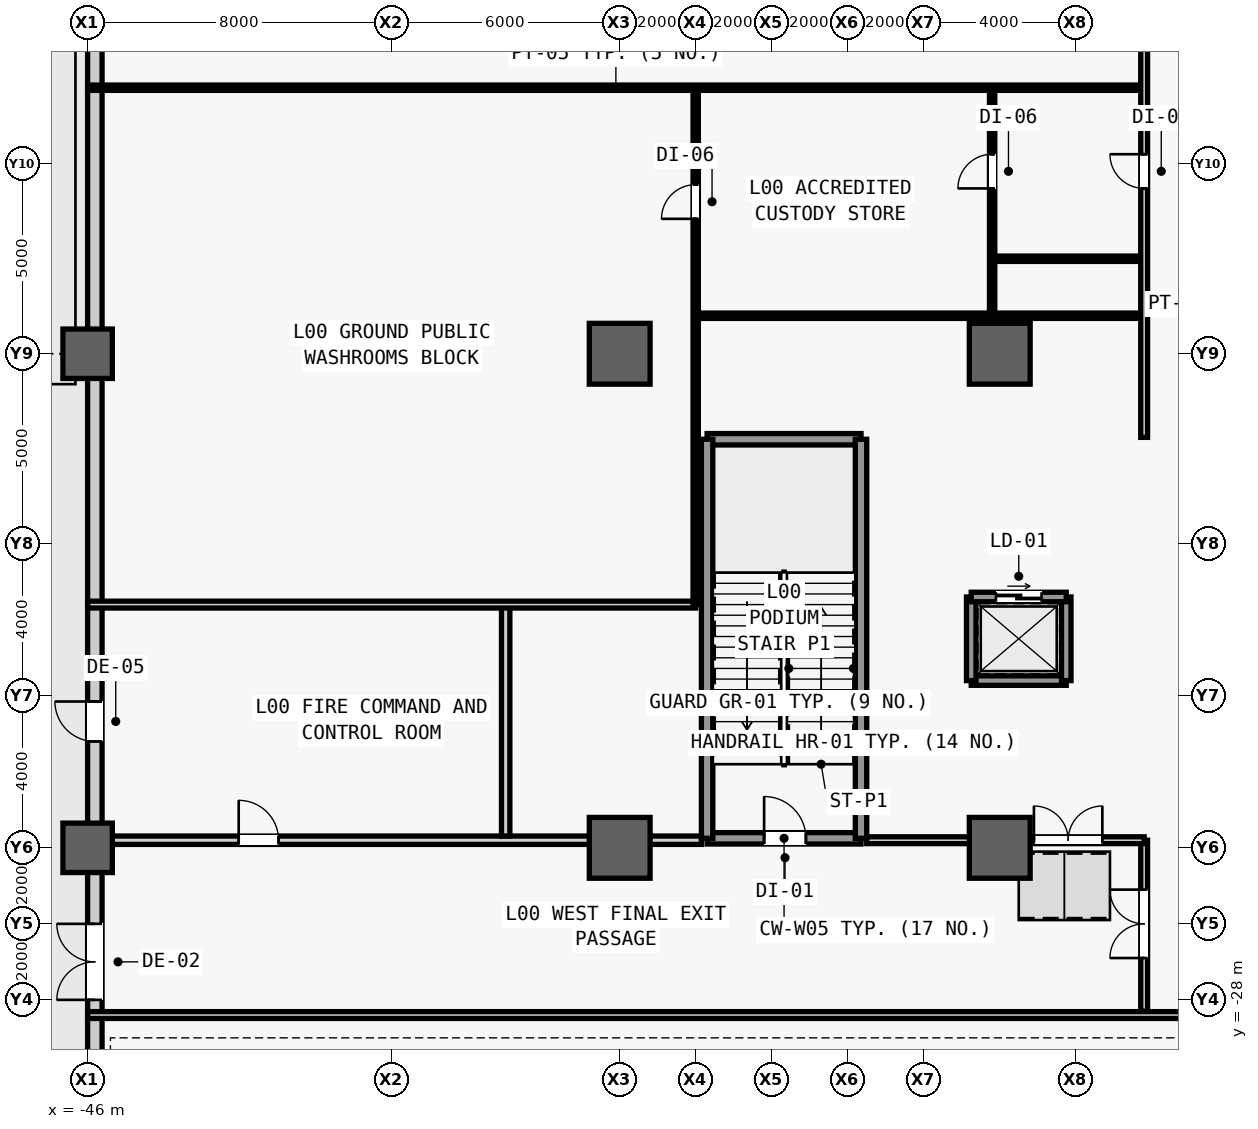
"""IFC4 building model, lengths in metres.
Left out: names, types, materials, properties, quantities, classifications, styles, units other than length and angle.
Written with IfcOpenShell. Run it as: python <this file> out.ifc"""

import sys

from ifc_helpers import new_model, si_unit, direction, frame, frame_2d, origin, origin_2d, place, context, subcontext, project, spatial, rectangle, extrude, source, transform, mapped, element, fill, save


model = new_model("IFC4")
c1 = context("Model", 3, precision=1e-05, world=origin(), true_north=direction((0.0, 1.0)))
c2 = subcontext(c1, "Body", "Model", "MODEL_VIEW")
j1 = project(units=[si_unit("LENGTHUNIT", "METRE"), si_unit("PLANEANGLEUNIT", "RADIAN")], contexts=[c1])
p1 = place(None, origin())
s1 = spatial("IfcSite", under=j1, at=p1, CompositionType="ELEMENT")
p2 = place(p1, origin())
s2 = spatial("IfcBuilding", under=s1, at=p2, CompositionType="ELEMENT")
p3 = place(p2, origin())
s3 = spatial("IfcBuildingStorey", under=s2, at=p3, CompositionType="ELEMENT", Elevation=0.0)
m1 = source(origin(), c2, "Body", "SweptSolid", [
    extrude(rectangle(XDim=1.3, YDim=1.3, at=origin_2d()), origin(), (0.0, 0.0, 1.0), 6.6),
])
for number, where, z_axis, x_axis in (
    (1, (-46.0, -24.0, 0.0), (0.0, 0.0, 1.0), (1.0, 0.0, 0.0)),
    (2, (-46.0, -11.0, 0.0), (0.0, 0.0, 1.0), (1.0, 0.0, 0.0)),
):
    element("IfcColumn", number, at=place(p3, frame(where, z_axis=z_axis, x_axis=x_axis)), inside=s3, PredefinedType="COLUMN", context=c2, shape_type="MappedRepresentation", body=[
        mapped(m1, transform((0.0, 0.0, 0.0), scale=1.0)),
    ])
m2 = source(origin(), c2, "Body", "SweptSolid", [
    extrude(rectangle(XDim=1.6, YDim=1.6, at=origin_2d()), origin(), (0.0, 0.0, 1.0), 6.6),
])
for number, where, z_axis, x_axis in (
    (3, (-32.0, -24.0, 0.0), (0.0, 0.0, 1.0), (1.0, 0.0, 0.0)),
    (4, (-32.0, -11.0, 0.0), (0.0, 0.0, 1.0), (1.0, 0.0, 0.0)),
    (5, (-22.0, -24.0, 0.0), (0.0, 0.0, 1.0), (1.0, 0.0, 0.0)),
    (6, (-22.0, -11.0, 0.0), (0.0, 0.0, 1.0), (1.0, 0.0, 0.0)),
):
    element("IfcColumn", number, at=place(p3, frame(where, z_axis=z_axis, x_axis=x_axis)), inside=s3, PredefinedType="COLUMN", context=c2, shape_type="MappedRepresentation", body=[
        mapped(m2, transform((0.0, 0.0, 0.0), scale=1.0)),
    ])
m3 = source(origin(), c2, "Body", "SweptSolid", [
    extrude(rectangle(XDim=75.1, YDim=0.38, at=frame_2d((37.55, 0.0))), origin(), (0.0, 0.0, 1.0), 4.48),
])
p4 = place(p3, frame((-45.81, -37.55, 0.0), z_axis=(0.0, 0.0, 1.0), x_axis=(0.0, 1.0, 0.0)))
e7 = element("IfcWall", 7, at=p4, inside=s3, PredefinedType="STANDARD", context=c2, shape_type="MappedRepresentation", body=[
    mapped(m3, transform((0.0, 0.0, 0.0), scale=1.0)),
])
m4 = source(origin(), c2, "Body", "SweptSolid", [
    extrude(rectangle(XDim=2.0, YDim=2.3, at=frame_2d((1.0, 1.15))), frame((0.0, 0.2, 0.0), z_axis=(0.0, -1.0, 0.0), x_axis=(1.0, 0.0, 0.0)), (0.0, 0.0, 1.0), 0.4),
])
p5 = place(p4, frame((9.55, 0.0, 0.0)))
e8 = element("IfcOpeningElement", 8, at=p5, cuts=e7, PredefinedType="OPENING", context=c2, shape_type="MappedRepresentation", body=[
    mapped(m4, transform((0.0, 0.0, 0.0), scale=1.0)),
])
m5 = source(origin(), c2, "Body", "SweptSolid", [
    extrude(rectangle(XDim=1.05, YDim=2.25, at=frame_2d((0.525, 1.125))), frame((0.0, 0.2, 0.0), z_axis=(0.0, -1.0, 0.0), x_axis=(1.0, 0.0, 0.0)), (0.0, 0.0, 1.0), 0.4),
])
p6 = place(p4, frame((16.35, 0.0, 0.0)))
e9 = element("IfcOpeningElement", 9, at=p6, cuts=e7, PredefinedType="OPENING", context=c2, shape_type="MappedRepresentation", body=[
    mapped(m5, transform((0.0, 0.0, 0.0), scale=1.0)),
])
m6 = source(origin(), c2, "Body", "SweptSolid", [
    extrude(rectangle(XDim=4.2, YDim=4.2, at=frame_2d((2.1, 2.1))), frame((0.0, 0.2, 0.0), z_axis=(0.0, -1.0, 0.0), x_axis=(1.0, 0.0, 0.0)), (0.0, 0.0, 1.0), 0.4),
])
p7 = place(p4, frame((64.45, 0.0, 0.0)))
e10 = element("IfcOpeningElement", 10, at=p7, cuts=e7, PredefinedType="OPENING", context=c2, shape_type="MappedRepresentation", body=[
    mapped(m6, transform((0.0, 0.0, 0.0), scale=1.0)),
])
m7 = source(origin(), c2, "Body", "SweptSolid", [
    extrude(rectangle(XDim=2.4, YDim=2.6, at=frame_2d((1.2, 1.3))), frame((0.0, 0.2, 0.0), z_axis=(0.0, -1.0, 0.0), x_axis=(1.0, 0.0, 0.0)), (0.0, 0.0, 1.0), 0.4),
])
p8 = place(p4, frame((55.125, 0.0, 0.7)))
e11 = element("IfcOpeningElement", 11, at=p8, cuts=e7, PredefinedType="OPENING", context=c2, shape_type="MappedRepresentation", body=[
    mapped(m7, transform((0.0, 0.0, 0.0), scale=1.0)),
])
m8 = source(origin(), c2, "Body", "SweptSolid", [
    extrude(rectangle(XDim=4.05, YDim=0.3, at=frame_2d((2.025, 0.0))), origin(), (0.0, 0.0, 1.0), 6.28),
])
p9 = place(p3, frame((-29.7, -23.75, 0.0), z_axis=(0.0, 0.0, 1.0), x_axis=(1.0, 0.0, 0.0)))
e12 = element("IfcWall", 12, at=p9, inside=s3, PredefinedType="SHEAR", context=c2, shape_type="MappedRepresentation", body=[
    mapped(m8, transform((0.0, 0.0, 0.0), scale=1.0)),
])
m9 = source(origin(), c2, "Body", "SweptSolid", [
    extrude(rectangle(XDim=1.1, YDim=2.2, at=frame_2d((0.55, 1.1))), frame((0.0, 0.16, 0.0), z_axis=(0.0, -1.0, 0.0), x_axis=(1.0, 0.0, 0.0)), (0.0, 0.0, 1.0), 0.32),
])
p10 = place(p9, frame((1.5, 0.0, 0.0)))
e13 = element("IfcOpeningElement", 13, at=p10, cuts=e12, PredefinedType="OPENING", context=c2, shape_type="MappedRepresentation", body=[
    mapped(m9, transform((0.0, 0.0, 0.0), scale=1.0)),
])
p11 = place(p3, frame((-29.7, -13.25, 0.0), z_axis=(0.0, 0.0, 1.0), x_axis=(1.0, 0.0, 0.0)))
e14 = element("IfcWall", 14, at=p11, inside=s3, PredefinedType="SHEAR", context=c2, shape_type="MappedRepresentation", body=[
    mapped(m8, transform((0.0, 0.0, 0.0), scale=1.0)),
])
m10 = source(origin(), c2, "Body", "SweptSolid", [
    extrude(rectangle(XDim=10.5, YDim=0.3, at=frame_2d((5.25, 0.0))), origin(), (0.0, 0.0, 1.0), 6.28),
])
for number, where, z_axis, x_axis in (
    (15, (-29.7, -23.75, 0.0), (0.0, 0.0, 1.0), (0.0, 1.0, 0.0)),
    (16, (-25.65, -23.75, 0.0), (0.0, 0.0, 1.0), (0.0, 1.0, 0.0)),
):
    element("IfcWall", number, at=place(p3, frame(where, z_axis=z_axis, x_axis=x_axis)), inside=s3, PredefinedType="SHEAR", context=c2, shape_type="MappedRepresentation", body=[
        mapped(m10, transform((0.0, 0.0, 0.0), scale=1.0)),
    ])
m11 = source(origin(), c2, "Body", "SweptSolid", [
    extrude(rectangle(XDim=2.5, YDim=0.25, at=frame_2d((1.25, 0.0))), origin(), (0.0, 0.0, 1.0), 6.28),
])
p12 = place(p3, frame((-22.75, -19.6, 0.0), z_axis=(0.0, 0.0, 1.0), x_axis=(1.0, 0.0, 0.0)))
e17 = element("IfcWall", 17, at=p12, inside=s3, PredefinedType="SHEAR", context=c2, shape_type="MappedRepresentation", body=[
    mapped(m11, transform((0.0, 0.0, 0.0), scale=1.0)),
])
m12 = source(origin(), c2, "Body", "SweptSolid", [
    extrude(rectangle(XDim=2.2, YDim=0.25, at=frame_2d((1.1, 0.0))), origin(), (0.0, 0.0, 1.0), 6.28),
])
for number, where, z_axis, x_axis in (
    (18, (-22.75, -19.6, 0.0), (0.0, 0.0, 1.0), (0.0, 1.0, 0.0)),
    (19, (-20.25, -19.6, 0.0), (0.0, 0.0, 1.0), (0.0, 1.0, 0.0)),
):
    element("IfcWall", number, at=place(p3, frame(where, z_axis=z_axis, x_axis=x_axis)), inside=s3, PredefinedType="SHEAR", context=c2, shape_type="MappedRepresentation", body=[
        mapped(m12, transform((0.0, 0.0, 0.0), scale=1.0)),
    ])
p13 = place(p3, frame((-22.75, -17.4, 0.0), z_axis=(0.0, 0.0, 1.0), x_axis=(1.0, 0.0, 0.0)))
e20 = element("IfcWall", 20, at=p13, inside=s3, PredefinedType="SHEAR", context=c2, shape_type="MappedRepresentation", body=[
    mapped(m11, transform((0.0, 0.0, 0.0), scale=1.0)),
])
m13 = source(origin(), c2, "Body", "SweptSolid", [
    extrude(rectangle(XDim=1.2, YDim=2.3, at=frame_2d((0.6, 1.15))), frame((0.0, 0.135, 0.0), z_axis=(0.0, -1.0, 0.0), x_axis=(1.0, 0.0, 0.0)), (0.0, 0.0, 1.0), 0.27),
])
p14 = place(p13, frame((0.65, 0.0, 0.0)))
e21 = element("IfcOpeningElement", 21, at=p14, cuts=e20, PredefinedType="OPENING", context=c2, shape_type="MappedRepresentation", body=[
    mapped(m13, transform((0.0, 0.0, 0.0), scale=1.0)),
])
m14 = source(origin(), c2, "Body", "SweptSolid", [
    extrude(rectangle(XDim=30.6, YDim=0.18, at=frame_2d((15.3, 0.0))), origin(), (0.0, 0.0, 1.0), 4.08),
])
p15 = place(p3, frame((-46.0, -28.4, 0.0), z_axis=(0.0, 0.0, 1.0), x_axis=(1.0, 0.0, 0.0)))
e22 = element("IfcWall", 22, at=p15, inside=s3, PredefinedType="PARTITIONING", context=c2, shape_type="MappedRepresentation", body=[
    mapped(m14, transform((0.0, 0.0, 0.0), scale=1.0)),
])
m15 = source(origin(), c2, "Body", "SweptSolid", [
    extrude(rectangle(XDim=4.5, YDim=0.18, at=frame_2d((2.25, 0.0))), origin(), (0.0, 0.0, 1.0), 6.28),
])
p16 = place(p3, frame((-18.2, -28.3, 0.0), z_axis=(0.0, 0.0, 1.0), x_axis=(0.0, 1.0, 0.0)))
e23 = element("IfcWall", 23, at=p16, inside=s3, PredefinedType="PARTITIONING", context=c2, shape_type="MappedRepresentation", body=[
    mapped(m15, transform((0.0, 0.0, 0.0), scale=1.0)),
])
m16 = source(origin(), c2, "Body", "SweptSolid", [
    extrude(rectangle(XDim=1.8, YDim=2.25, at=frame_2d((0.9, 1.125))), frame((0.0, 0.1, 0.0), z_axis=(0.0, -1.0, 0.0), x_axis=(1.0, 0.0, 0.0)), (0.0, 0.0, 1.0), 0.2),
])
p17 = place(p16, frame((1.4, 0.0, 0.0)))
e24 = element("IfcOpeningElement", 24, at=p17, cuts=e23, PredefinedType="OPENING", context=c2, shape_type="MappedRepresentation", body=[
    mapped(m16, transform((0.0, 0.0, 0.0), scale=1.0)),
])
m17 = source(origin(), c2, "Body", "SweptSolid", [
    extrude(rectangle(XDim=16.15, YDim=0.22, at=frame_2d((8.075, 0.0))), origin(), (0.0, 0.0, 1.0), 4.48),
])
p18 = place(p3, frame((-46.0, -23.8, 0.0), z_axis=(0.0, 0.0, 1.0), x_axis=(1.0, 0.0, 0.0)))
e25 = element("IfcWall", 25, at=p18, inside=s3, PredefinedType="PARTITIONING", context=c2, shape_type="MappedRepresentation", body=[
    mapped(m17, transform((0.0, 0.0, 0.0), scale=1.0)),
])
m18 = source(origin(), c2, "Body", "SweptSolid", [
    extrude(rectangle(XDim=1.05, YDim=2.2, at=frame_2d((0.525, 1.1))), frame((0.0, 0.12, 0.0), z_axis=(0.0, -1.0, 0.0), x_axis=(1.0, 0.0, 0.0)), (0.0, 0.0, 1.0), 0.24),
])
p19 = place(p18, frame((3.975, 0.0, 0.0)))
e26 = element("IfcOpeningElement", 26, at=p19, cuts=e25, PredefinedType="OPENING", context=c2, shape_type="MappedRepresentation", body=[
    mapped(m18, transform((0.0, 0.0, 0.0), scale=1.0)),
])
m19 = source(origin(), c2, "Body", "SweptSolid", [
    extrude(rectangle(XDim=7.3, YDim=0.18, at=frame_2d((3.65, 0.0))), origin(), (0.0, 0.0, 1.0), 4.08),
])
p20 = place(p3, frame((-25.5, -23.8, 0.0), z_axis=(0.0, 0.0, 1.0), x_axis=(1.0, 0.0, 0.0)))
e27 = element("IfcWall", 27, at=p20, inside=s3, PredefinedType="PARTITIONING", context=c2, shape_type="MappedRepresentation", body=[
    mapped(m19, transform((0.0, 0.0, 0.0), scale=1.0)),
])
p21 = place(p20, frame((4.4, 0.0, 0.0)))
e28 = element("IfcOpeningElement", 28, at=p21, cuts=e27, PredefinedType="OPENING", context=c2, shape_type="MappedRepresentation", body=[
    mapped(m16, transform((0.0, 0.0, 0.0), scale=1.0)),
])
m20 = source(origin(), c2, "Body", "SweptSolid", [
    extrude(rectangle(XDim=6.09, YDim=0.22, at=frame_2d((3.045, 0.0))), origin(), (0.0, 0.0, 1.0), 6.28),
])
p22 = place(p3, frame((-35.0, -23.69, 0.0), z_axis=(0.0, 0.0, 1.0), x_axis=(0.0, 1.0, 0.0)))
e29 = element("IfcWall", 29, at=p22, inside=s3, PredefinedType="PARTITIONING", context=c2, shape_type="MappedRepresentation", body=[
    mapped(m20, transform((0.0, 0.0, 0.0), scale=1.0)),
])
m21 = source(origin(), c2, "Body", "SweptSolid", [
    extrude(rectangle(XDim=16.0, YDim=0.18, at=frame_2d((8.0, 0.0))), origin(), (0.0, 0.0, 1.0), 6.28),
])
p23 = place(p3, frame((-46.0, -17.6, 0.0), z_axis=(0.0, 0.0, 1.0), x_axis=(1.0, 0.0, 0.0)))
e30 = element("IfcWall", 30, at=p23, inside=s3, PredefinedType="PARTITIONING", context=c2, shape_type="MappedRepresentation", body=[
    mapped(m21, transform((0.0, 0.0, 0.0), scale=1.0)),
])
m22 = source(origin(), c2, "Body", "SweptSolid", [
    extrude(rectangle(XDim=27.8, YDim=0.14, at=frame_2d((13.9, 0.0))), origin(), (0.0, 0.0, 1.0), 6.28),
])
p24 = place(p3, frame((-46.0, -4.0, 0.0), z_axis=(0.0, 0.0, 1.0), x_axis=(1.0, 0.0, 0.0)))
e31 = element("IfcWall", 31, at=p24, inside=s3, PredefinedType="PARTITIONING", context=c2, shape_type="MappedRepresentation", body=[
    mapped(m22, transform((0.0, 0.0, 0.0), scale=1.0)),
])
m23 = source(origin(), c2, "Body", "SweptSolid", [
    extrude(rectangle(XDim=13.6, YDim=0.14, at=frame_2d((6.8, 0.0))), origin(), (0.0, 0.0, 1.0), 6.28),
])
p25 = place(p3, frame((-30.0, -17.6, 0.0), z_axis=(0.0, 0.0, 1.0), x_axis=(0.0, 1.0, 0.0)))
e32 = element("IfcWall", 32, at=p25, inside=s3, PredefinedType="PARTITIONING", context=c2, shape_type="MappedRepresentation", body=[
    mapped(m23, transform((0.0, 0.0, 0.0), scale=1.0)),
])
m24 = source(origin(), c2, "Body", "SweptSolid", [
    extrude(rectangle(XDim=0.9, YDim=2.15, at=frame_2d((0.45, 1.075))), frame((0.0, 0.08, 0.0), z_axis=(0.0, -1.0, 0.0), x_axis=(1.0, 0.0, 0.0)), (0.0, 0.0, 1.0), 0.16),
])
p26 = place(p25, frame((10.15, 0.0, 0.0)))
e33 = element("IfcOpeningElement", 33, at=p26, cuts=e32, PredefinedType="OPENING", context=c2, shape_type="MappedRepresentation", body=[
    mapped(m24, transform((0.0, 0.0, 0.0), scale=1.0)),
])
m25 = source(origin(), c2, "Body", "SweptSolid", [
    extrude(rectangle(XDim=11.8, YDim=0.14, at=frame_2d((5.9, 0.0))), origin(), (0.0, 0.0, 1.0), 6.28),
])
p27 = place(p3, frame((-30.0, -10.0, 0.0), z_axis=(0.0, 0.0, 1.0), x_axis=(1.0, 0.0, 0.0)))
e34 = element("IfcWall", 34, at=p27, inside=s3, PredefinedType="PARTITIONING", context=c2, shape_type="MappedRepresentation", body=[
    mapped(m25, transform((0.0, 0.0, 0.0), scale=1.0)),
])
m26 = source(origin(), c2, "Body", "SweptSolid", [
    extrude(rectangle(XDim=6.0, YDim=0.14, at=frame_2d((3.0, 0.0))), origin(), (0.0, 0.0, 1.0), 4.48),
])
p28 = place(p3, frame((-22.2, -10.0, 0.0), z_axis=(0.0, 0.0, 1.0), x_axis=(0.0, 1.0, 0.0)))
e35 = element("IfcWall", 35, at=p28, inside=s3, PredefinedType="PARTITIONING", context=c2, shape_type="MappedRepresentation", body=[
    mapped(m26, transform((0.0, 0.0, 0.0), scale=1.0)),
])
p29 = place(p28, frame((3.35, 0.0, 0.0)))
e36 = element("IfcOpeningElement", 36, at=p29, cuts=e35, PredefinedType="OPENING", context=c2, shape_type="MappedRepresentation", body=[
    mapped(m24, transform((0.0, 0.0, 0.0), scale=1.0)),
])
m27 = source(origin(), c2, "Body", "SweptSolid", [
    extrude(rectangle(XDim=4.0, YDim=0.14, at=frame_2d((2.0, 0.0))), origin(), (0.0, 0.0, 1.0), 6.28),
])
p30 = place(p3, frame((-22.2, -8.5, 0.0), z_axis=(0.0, 0.0, 1.0), x_axis=(1.0, 0.0, 0.0)))
e37 = element("IfcWall", 37, at=p30, inside=s3, PredefinedType="PARTITIONING", context=c2, shape_type="MappedRepresentation", body=[
    mapped(m27, transform((0.0, 0.0, 0.0), scale=1.0)),
])
m28 = source(origin(), c2, "Body", "SweptSolid", [
    extrude(rectangle(XDim=27.0, YDim=0.18, at=frame_2d((13.5, 0.0))), origin(), (0.0, 0.0, 1.0), 6.28),
])
p31 = place(p3, frame((-18.2, -13.2, 0.0), z_axis=(0.0, 0.0, 1.0), x_axis=(0.0, 1.0, 0.0)))
e38 = element("IfcWall", 38, at=p31, inside=s3, PredefinedType="PARTITIONING", context=c2, shape_type="MappedRepresentation", body=[
    mapped(m28, transform((0.0, 0.0, 0.0), scale=1.0)),
])
m29 = source(origin(), c2, "Body", "SweptSolid", [
    extrude(rectangle(XDim=0.9, YDim=2.15, at=frame_2d((0.45, 1.075))), frame((0.0, 0.1, 0.0), z_axis=(0.0, -1.0, 0.0), x_axis=(1.0, 0.0, 0.0)), (0.0, 0.0, 1.0), 0.2),
])
p32 = place(p31, frame((6.55, 0.0, 0.0)))
e39 = element("IfcOpeningElement", 39, at=p32, cuts=e38, PredefinedType="OPENING", context=c2, shape_type="MappedRepresentation", body=[
    mapped(m29, transform((0.0, 0.0, 0.0), scale=1.0)),
])
m30 = source(origin(), c2, "Body", "SweptSolid", [
    extrude(rectangle(XDim=1.05, YDim=2.2, at=frame_2d((0.525, 1.1))), frame((0.0, 0.1, 0.0), z_axis=(0.0, -1.0, 0.0), x_axis=(1.0, 0.0, 0.0)), (0.0, 0.0, 1.0), 0.2),
])
p33 = place(p31, frame((17.675, 0.0, 0.0)))
e40 = element("IfcOpeningElement", 40, at=p33, cuts=e38, PredefinedType="OPENING", context=c2, shape_type="MappedRepresentation", body=[
    mapped(m30, transform((0.0, 0.0, 0.0), scale=1.0)),
])
m31 = source(origin(), c2, "Body", "SweptSolid", [
    extrude(rectangle(XDim=2.0, YDim=2.3, at=frame_2d((1.0, 1.15))), frame((0.0, 0.025, 0.0), z_axis=(0.0, -1.0, 0.0), x_axis=(1.0, 0.0, 0.0)), (0.0, 0.0, 1.0), 0.05),
])
p34 = place(p5, origin())
e41 = element("IfcDoor", 41, at=p34, inside=s3, OperationType="SINGLE_SWING_RIGHT", PredefinedType="DOOR", context=c2, shape_type="MappedRepresentation", body=[
    mapped(m31, transform((0.0, 0.0, 0.0), scale=1.0)),
])
fill(e8, e41)
m32 = source(origin(), c2, "Body", "SweptSolid", [
    extrude(rectangle(XDim=1.05, YDim=2.25, at=frame_2d((0.525, 1.125))), frame((0.0, 0.025, 0.0), z_axis=(0.0, -1.0, 0.0), x_axis=(1.0, 0.0, 0.0)), (0.0, 0.0, 1.0), 0.05),
])
p35 = place(p6, origin())
e42 = element("IfcDoor", 42, at=p35, inside=s3, OperationType="SINGLE_SWING_RIGHT", PredefinedType="DOOR", context=c2, shape_type="MappedRepresentation", body=[
    mapped(m32, transform((0.0, 0.0, 0.0), scale=1.0)),
])
fill(e9, e42)
m33 = source(origin(), c2, "Body", "SweptSolid", [
    extrude(rectangle(XDim=1.1, YDim=2.2, at=frame_2d((0.55, 1.1))), frame((0.0, 0.025, 0.0), z_axis=(0.0, -1.0, 0.0), x_axis=(1.0, 0.0, 0.0)), (0.0, 0.0, 1.0), 0.05),
])
p36 = place(p10, origin())
e43 = element("IfcDoor", 43, at=p36, inside=s3, OperationType="SINGLE_SWING_LEFT", PredefinedType="DOOR", context=c2, shape_type="MappedRepresentation", body=[
    mapped(m33, transform((0.0, 0.0, 0.0), scale=1.0)),
])
fill(e13, e43)
m34 = source(origin(), c2, "Body", "SweptSolid", [
    extrude(rectangle(XDim=1.8, YDim=2.25, at=frame_2d((0.9, 1.125))), frame((0.0, 0.025, 0.0), z_axis=(0.0, -1.0, 0.0), x_axis=(1.0, 0.0, 0.0)), (0.0, 0.0, 1.0), 0.05),
])
p37 = place(p17, origin())
e44 = element("IfcDoor", 44, at=p37, inside=s3, OperationType="SINGLE_SWING_LEFT", PredefinedType="DOOR", context=c2, shape_type="MappedRepresentation", body=[
    mapped(m34, transform((0.0, 0.0, 0.0), scale=1.0)),
])
fill(e24, e44)
m35 = source(origin(), c2, "Body", "SweptSolid", [
    extrude(rectangle(XDim=1.05, YDim=2.2, at=frame_2d((0.525, 1.1))), frame((0.0, 0.025, 0.0), z_axis=(0.0, -1.0, 0.0), x_axis=(1.0, 0.0, 0.0)), (0.0, 0.0, 1.0), 0.05),
])
p38 = place(p19, origin())
e45 = element("IfcDoor", 45, at=p38, inside=s3, OperationType="SINGLE_SWING_LEFT", PredefinedType="DOOR", context=c2, shape_type="MappedRepresentation", body=[
    mapped(m35, transform((0.0, 0.0, 0.0), scale=1.0)),
])
fill(e26, e45)
p39 = place(p21, origin())
e46 = element("IfcDoor", 46, at=p39, inside=s3, OperationType="SINGLE_SWING_LEFT", PredefinedType="DOOR", context=c2, shape_type="MappedRepresentation", body=[
    mapped(m34, transform((0.0, 0.0, 0.0), scale=1.0)),
])
fill(e28, e46)
m36 = source(origin(), c2, "Body", "SweptSolid", [
    extrude(rectangle(XDim=0.9, YDim=2.15, at=frame_2d((0.45, 1.075))), frame((0.0, 0.025, 0.0), z_axis=(0.0, -1.0, 0.0), x_axis=(1.0, 0.0, 0.0)), (0.0, 0.0, 1.0), 0.05),
])
p40 = place(p26, origin())
e47 = element("IfcDoor", 47, at=p40, inside=s3, OperationType="SINGLE_SWING_LEFT", PredefinedType="DOOR", context=c2, shape_type="MappedRepresentation", body=[
    mapped(m36, transform((0.0, 0.0, 0.0), scale=1.0)),
])
fill(e33, e47)
p41 = place(p29, origin())
e48 = element("IfcDoor", 48, at=p41, inside=s3, OperationType="SINGLE_SWING_LEFT", PredefinedType="DOOR", context=c2, shape_type="MappedRepresentation", body=[
    mapped(m36, transform((0.0, 0.0, 0.0), scale=1.0)),
])
fill(e36, e48)
p42 = place(p32, origin())
e49 = element("IfcDoor", 49, at=p42, inside=s3, OperationType="SINGLE_SWING_RIGHT", PredefinedType="DOOR", context=c2, shape_type="MappedRepresentation", body=[
    mapped(m36, transform((0.0, 0.0, 0.0), scale=1.0)),
])
fill(e39, e49)
m37 = source(origin(), c2, "Body", "SweptSolid", [
    extrude(rectangle(XDim=1.2, YDim=2.3, at=frame_2d((0.6, 1.15))), frame((0.0, 0.025, 0.0), z_axis=(0.0, -1.0, 0.0), x_axis=(1.0, 0.0, 0.0)), (0.0, 0.0, 1.0), 0.05),
])
p43 = place(p14, origin())
e50 = element("IfcDoor", 50, at=p43, inside=s3, OperationType="SLIDING_TO_LEFT", PredefinedType="DOOR", context=c2, shape_type="MappedRepresentation", body=[
    mapped(m37, transform((0.0, 0.0, 0.0), scale=1.0)),
])
fill(e21, e50)
save(model, sys.argv[1])
